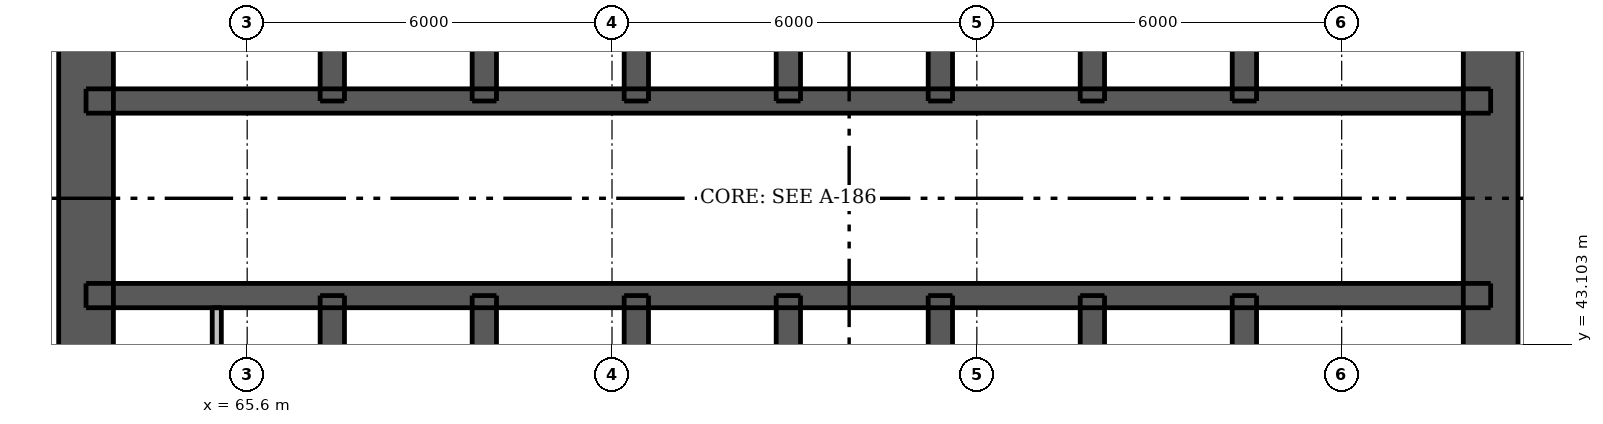
"""IFC4 building model, lengths in metres.
Left out: names, types, materials, properties, quantities, classifications, styles, units other than length and angle.
Written with IfcOpenShell. Run it as: python <this file> out.ifc"""

import sys

from ifc_helpers import new_model, si_unit, direction, frame, frame_2d, origin, place, context, subcontext, project, spatial, rectangle, extrude, element, fill, save


model = new_model("IFC4")
c1 = context("Model", 3, precision=1e-05, world=origin(), true_north=direction((0.0, 1.0)))
c2 = subcontext(c1, "Body", "Model", "MODEL_VIEW")
j1 = project(units=[si_unit("LENGTHUNIT", "METRE"), si_unit("PLANEANGLEUNIT", "RADIAN")], contexts=[c1])
p1 = place(None, origin())
s1 = spatial("IfcSite", under=j1, at=p1, CompositionType="ELEMENT")
p2 = place(p1, origin())
s2 = spatial("IfcBuilding", under=s1, at=p2, CompositionType="ELEMENT")
p3 = place(p2, frame((0.0, 0.0, 33.4)))
s3 = spatial("IfcBuildingStorey", under=s2, at=p3, CompositionType="ELEMENT", Elevation=33.4)
p4 = place(p3, frame((62.95, 33.5, 0.0), z_axis=(0.0, 0.0, 1.0), x_axis=(0.0, 1.0, 0.0)))
e1 = element("IfcWall", 1, at=p4, inside=s3, PredefinedType="SHEAR", context=c2, shape_type="SweptSolid", body=[
    extrude(rectangle(XDim=24.0, YDim=0.9, at=frame_2d((12.0, 0.0))), origin(), (0.0, 0.0, 1.0), 3.05),
])
p5 = place(p4, frame((11.2, 0.0, 0.0)))
e2 = element("IfcOpeningElement", 2, at=p5, cuts=e1, PredefinedType="OPENING", context=c2, shape_type="SweptSolid", body=[
    extrude(rectangle(XDim=1.6, YDim=2.1, at=frame_2d((0.8, 1.05))), frame((0.0, 0.46, 0.0), z_axis=(0.0, -1.0, 0.0), x_axis=(1.0, 0.0, 0.0)), (0.0, 0.0, 1.0), 0.92),
])
p6 = place(p3, frame((86.05, 33.5, 0.0), z_axis=(0.0, 0.0, 1.0), x_axis=(0.0, 1.0, 0.0)))
e3 = element("IfcWall", 3, at=p6, inside=s3, PredefinedType="SHEAR", context=c2, shape_type="SweptSolid", body=[
    extrude(rectangle(XDim=24.0, YDim=0.9, at=frame_2d((12.0, 0.0))), origin(), (0.0, 0.0, 1.0), 3.05),
])
p7 = place(p6, frame((11.2, 0.0, 0.0)))
e4 = element("IfcOpeningElement", 4, at=p7, cuts=e3, PredefinedType="OPENING", context=c2, shape_type="SweptSolid", body=[
    extrude(rectangle(XDim=1.6, YDim=2.1, at=frame_2d((0.8, 1.05))), frame((0.0, 0.46, 0.0), z_axis=(0.0, -1.0, 0.0), x_axis=(1.0, 0.0, 0.0)), (0.0, 0.0, 1.0), 0.92),
])
p8 = place(p3, frame((62.95, 43.9, 0.0), z_axis=(0.0, 0.0, 1.0), x_axis=(1.0, 0.0, 0.0)))
e5 = element("IfcWall", 5, at=p8, inside=s3, PredefinedType="SHEAR", context=c2, shape_type="SweptSolid", body=[
    extrude(rectangle(XDim=23.1, YDim=0.4, at=frame_2d((11.55, 0.0))), origin(), (0.0, 0.0, 1.0), 3.05),
])
p9 = place(p8, frame((0.85, 0.0, 0.0)))
e6 = element("IfcOpeningElement", 6, at=p9, cuts=e5, PredefinedType="OPENING", context=c2, shape_type="SweptSolid", body=[
    extrude(rectangle(XDim=0.9, YDim=2.1, at=frame_2d((0.45, 1.05))), frame((0.0, 0.21, 0.0), z_axis=(0.0, -1.0, 0.0), x_axis=(1.0, 0.0, 0.0)), (0.0, 0.0, 1.0), 0.42),
])
p10 = place(p8, frame((2.55, 0.0, 0.0)))
e7 = element("IfcOpeningElement", 7, at=p10, cuts=e5, PredefinedType="OPENING", context=c2, shape_type="SweptSolid", body=[
    extrude(rectangle(XDim=0.9, YDim=2.1, at=frame_2d((0.45, 1.05))), frame((0.0, 0.21, 0.0), z_axis=(0.0, -1.0, 0.0), x_axis=(1.0, 0.0, 0.0)), (0.0, 0.0, 1.0), 0.42),
])
p11 = place(p8, frame((20.5, 0.0, 0.0)))
e8 = element("IfcOpeningElement", 8, at=p11, cuts=e5, PredefinedType="OPENING", context=c2, shape_type="SweptSolid", body=[
    extrude(rectangle(XDim=0.9, YDim=2.1, at=frame_2d((0.45, 1.05))), frame((0.0, 0.21, 0.0), z_axis=(0.0, -1.0, 0.0), x_axis=(1.0, 0.0, 0.0)), (0.0, 0.0, 1.0), 0.42),
])
p12 = place(p8, frame((4.75, 0.0, 0.0)))
e9 = element("IfcOpeningElement", 9, at=p12, cuts=e5, PredefinedType="OPENING", context=c2, shape_type="SweptSolid", body=[
    extrude(rectangle(XDim=1.1, YDim=2.1, at=frame_2d((0.55, 1.05))), frame((0.0, 0.21, 0.0), z_axis=(0.0, -1.0, 0.0), x_axis=(1.0, 0.0, 0.0)), (0.0, 0.0, 1.0), 0.42),
])
p13 = place(p8, frame((7.25, 0.0, 0.0)))
e10 = element("IfcOpeningElement", 10, at=p13, cuts=e5, PredefinedType="OPENING", context=c2, shape_type="SweptSolid", body=[
    extrude(rectangle(XDim=1.1, YDim=2.1, at=frame_2d((0.55, 1.05))), frame((0.0, 0.21, 0.0), z_axis=(0.0, -1.0, 0.0), x_axis=(1.0, 0.0, 0.0)), (0.0, 0.0, 1.0), 0.42),
])
p14 = place(p8, frame((9.75, 0.0, 0.0)))
e11 = element("IfcOpeningElement", 11, at=p14, cuts=e5, PredefinedType="OPENING", context=c2, shape_type="SweptSolid", body=[
    extrude(rectangle(XDim=1.1, YDim=2.1, at=frame_2d((0.55, 1.05))), frame((0.0, 0.21, 0.0), z_axis=(0.0, -1.0, 0.0), x_axis=(1.0, 0.0, 0.0)), (0.0, 0.0, 1.0), 0.42),
])
p15 = place(p8, frame((12.25, 0.0, 0.0)))
e12 = element("IfcOpeningElement", 12, at=p15, cuts=e5, PredefinedType="OPENING", context=c2, shape_type="SweptSolid", body=[
    extrude(rectangle(XDim=1.1, YDim=2.1, at=frame_2d((0.55, 1.05))), frame((0.0, 0.21, 0.0), z_axis=(0.0, -1.0, 0.0), x_axis=(1.0, 0.0, 0.0)), (0.0, 0.0, 1.0), 0.42),
])
p16 = place(p8, frame((14.75, 0.0, 0.0)))
e13 = element("IfcOpeningElement", 13, at=p16, cuts=e5, PredefinedType="OPENING", context=c2, shape_type="SweptSolid", body=[
    extrude(rectangle(XDim=1.1, YDim=2.1, at=frame_2d((0.55, 1.05))), frame((0.0, 0.21, 0.0), z_axis=(0.0, -1.0, 0.0), x_axis=(1.0, 0.0, 0.0)), (0.0, 0.0, 1.0), 0.42),
])
p17 = place(p8, frame((17.25, 0.0, 0.0)))
e14 = element("IfcOpeningElement", 14, at=p17, cuts=e5, PredefinedType="OPENING", context=c2, shape_type="SweptSolid", body=[
    extrude(rectangle(XDim=1.1, YDim=2.1, at=frame_2d((0.55, 1.05))), frame((0.0, 0.21, 0.0), z_axis=(0.0, -1.0, 0.0), x_axis=(1.0, 0.0, 0.0)), (0.0, 0.0, 1.0), 0.42),
])
p18 = place(p3, frame((62.95, 47.1, 0.0), z_axis=(0.0, 0.0, 1.0), x_axis=(1.0, 0.0, 0.0)))
e15 = element("IfcWall", 15, at=p18, inside=s3, PredefinedType="SHEAR", context=c2, shape_type="SweptSolid", body=[
    extrude(rectangle(XDim=23.1, YDim=0.4, at=frame_2d((11.55, 0.0))), origin(), (0.0, 0.0, 1.0), 3.05),
])
p19 = place(p18, frame((1.7, 0.0, 0.0)))
e16 = element("IfcOpeningElement", 16, at=p19, cuts=e15, PredefinedType="OPENING", context=c2, shape_type="SweptSolid", body=[
    extrude(rectangle(XDim=0.9, YDim=2.1, at=frame_2d((0.45, 1.05))), frame((0.0, 0.21, 0.0), z_axis=(0.0, -1.0, 0.0), x_axis=(1.0, 0.0, 0.0)), (0.0, 0.0, 1.0), 0.42),
])
p20 = place(p18, frame((20.5, 0.0, 0.0)))
e17 = element("IfcOpeningElement", 17, at=p20, cuts=e15, PredefinedType="OPENING", context=c2, shape_type="SweptSolid", body=[
    extrude(rectangle(XDim=0.9, YDim=2.1, at=frame_2d((0.45, 1.05))), frame((0.0, 0.21, 0.0), z_axis=(0.0, -1.0, 0.0), x_axis=(1.0, 0.0, 0.0)), (0.0, 0.0, 1.0), 0.42),
])
p21 = place(p3, frame((67.0, 33.95, 0.0), z_axis=(0.0, 0.0, 1.0), x_axis=(0.0, 1.0, 0.0)))
e18 = element("IfcWall", 18, at=p21, inside=s3, PredefinedType="SHEAR", context=c2, shape_type="SweptSolid", body=[
    extrude(rectangle(XDim=9.95, YDim=0.4, at=frame_2d((4.975, 0.0))), origin(), (0.0, 0.0, 1.0), 3.05),
])
p22 = place(p21, frame((0.65, 0.0, 0.0)))
e19 = element("IfcOpeningElement", 19, at=p22, cuts=e18, PredefinedType="OPENING", context=c2, shape_type="SweptSolid", body=[
    extrude(rectangle(XDim=1.1, YDim=2.1, at=frame_2d((0.55, 1.05))), frame((0.0, 0.21, 0.0), z_axis=(0.0, -1.0, 0.0), x_axis=(1.0, 0.0, 0.0)), (0.0, 0.0, 1.0), 0.42),
])
for number, where, z_axis, x_axis in (
    (20, (67.0, 47.1, 0.0), (0.0, 0.0, 1.0), (0.0, 1.0, 0.0)),
    (21, (82.0, 33.95, 0.0), (0.0, 0.0, 1.0), (0.0, 1.0, 0.0)),
    (22, (82.0, 47.1, 0.0), (0.0, 0.0, 1.0), (0.0, 1.0, 0.0)),
):
    element("IfcWall", number, at=place(p3, frame(where, z_axis=z_axis, x_axis=x_axis)), inside=s3, PredefinedType="SHEAR", context=c2, shape_type="SweptSolid", body=[
        extrude(rectangle(XDim=9.95, YDim=0.4, at=frame_2d((4.975, 0.0))), origin(), (0.0, 0.0, 1.0), 3.05),
    ])
for number, where, z_axis, x_axis in (
    (23, (69.5, 41.0, 0.0), (0.0, 0.0, 1.0), (0.0, 1.0, 0.0)),
    (24, (69.5, 47.1, 0.0), (0.0, 0.0, 1.0), (0.0, 1.0, 0.0)),
    (25, (72.0, 41.0, 0.0), (0.0, 0.0, 1.0), (0.0, 1.0, 0.0)),
    (26, (72.0, 47.1, 0.0), (0.0, 0.0, 1.0), (0.0, 1.0, 0.0)),
    (27, (74.5, 41.0, 0.0), (0.0, 0.0, 1.0), (0.0, 1.0, 0.0)),
    (28, (74.5, 47.1, 0.0), (0.0, 0.0, 1.0), (0.0, 1.0, 0.0)),
    (29, (77.0, 41.0, 0.0), (0.0, 0.0, 1.0), (0.0, 1.0, 0.0)),
    (30, (77.0, 47.1, 0.0), (0.0, 0.0, 1.0), (0.0, 1.0, 0.0)),
    (31, (79.5, 41.0, 0.0), (0.0, 0.0, 1.0), (0.0, 1.0, 0.0)),
    (32, (79.5, 47.1, 0.0), (0.0, 0.0, 1.0), (0.0, 1.0, 0.0)),
):
    element("IfcWall", number, at=place(p3, frame(where, z_axis=z_axis, x_axis=x_axis)), inside=s3, PredefinedType="SHEAR", context=c2, shape_type="SweptSolid", body=[
        extrude(rectangle(XDim=2.9, YDim=0.4, at=frame_2d((1.45, 0.0))), origin(), (0.0, 0.0, 1.0), 3.05),
    ])
p23 = place(p3, frame((65.1, 41.2, 0.0), z_axis=(0.0, 0.0, 1.0), x_axis=(0.0, 1.0, 0.0)))
e33 = element("IfcWall", 33, at=p23, inside=s3, PredefinedType="PLUMBINGWALL", context=c2, shape_type="SweptSolid", body=[
    extrude(rectangle(XDim=2.5, YDim=0.15, at=frame_2d((1.25, 0.0))), origin(), (0.0, 0.0, 1.0), 3.05),
])
p24 = place(p5, origin())
e34 = element("IfcDoor", 34, at=p24, inside=s3, OperationType="DOUBLE_DOOR_SINGLE_SWING", PredefinedType="DOOR", context=c2, shape_type="SweptSolid", body=[
    extrude(rectangle(XDim=1.6, YDim=2.1, at=frame_2d((0.8, 1.05))), frame((0.0, -0.388, 0.0), z_axis=(0.0, -1.0, 0.0), x_axis=(1.0, 0.0, 0.0)), (0.0, 0.0, 1.0), 0.05),
])
fill(e2, e34)
p25 = place(p7, origin())
e35 = element("IfcDoor", 35, at=p25, inside=s3, OperationType="DOUBLE_DOOR_SINGLE_SWING", PredefinedType="DOOR", context=c2, shape_type="SweptSolid", body=[
    extrude(rectangle(XDim=1.6, YDim=2.1, at=frame_2d((0.8, 1.05))), frame((0.0, 0.438, 0.0), z_axis=(0.0, -1.0, 0.0), x_axis=(1.0, 0.0, 0.0)), (0.0, 0.0, 1.0), 0.05),
])
fill(e4, e35)
p26 = place(p9, origin())
e36 = element("IfcDoor", 36, at=p26, inside=s3, OperationType="SINGLE_SWING_LEFT", PredefinedType="DOOR", context=c2, shape_type="SweptSolid", body=[
    extrude(rectangle(XDim=0.9, YDim=2.1, at=frame_2d((0.45, 1.05))), frame((0.0, -0.138, 0.0), z_axis=(0.0, -1.0, 0.0), x_axis=(1.0, 0.0, 0.0)), (0.0, 0.0, 1.0), 0.05),
])
fill(e6, e36)
p27 = place(p10, origin())
e37 = element("IfcDoor", 37, at=p27, inside=s3, OperationType="SINGLE_SWING_RIGHT", PredefinedType="DOOR", context=c2, shape_type="SweptSolid", body=[
    extrude(rectangle(XDim=0.9, YDim=2.1, at=frame_2d((0.45, 1.05))), frame((0.0, -0.138, 0.0), z_axis=(0.0, -1.0, 0.0), x_axis=(1.0, 0.0, 0.0)), (0.0, 0.0, 1.0), 0.05),
])
fill(e7, e37)
p28 = place(p11, origin())
e38 = element("IfcDoor", 38, at=p28, inside=s3, OperationType="SINGLE_SWING_LEFT", PredefinedType="DOOR", context=c2, shape_type="SweptSolid", body=[
    extrude(rectangle(XDim=0.9, YDim=2.1, at=frame_2d((0.45, 1.05))), frame((0.0, -0.138, 0.0), z_axis=(0.0, -1.0, 0.0), x_axis=(1.0, 0.0, 0.0)), (0.0, 0.0, 1.0), 0.05),
])
fill(e8, e38)
p29 = place(p19, origin())
e39 = element("IfcDoor", 39, at=p29, inside=s3, OperationType="SINGLE_SWING_LEFT", PredefinedType="DOOR", context=c2, shape_type="SweptSolid", body=[
    extrude(rectangle(XDim=0.9, YDim=2.1, at=frame_2d((0.45, 1.05))), frame((0.0, 0.188, 0.0), z_axis=(0.0, -1.0, 0.0), x_axis=(1.0, 0.0, 0.0)), (0.0, 0.0, 1.0), 0.05),
])
fill(e16, e39)
p30 = place(p20, origin())
e40 = element("IfcDoor", 40, at=p30, inside=s3, OperationType="SINGLE_SWING_LEFT", PredefinedType="DOOR", context=c2, shape_type="SweptSolid", body=[
    extrude(rectangle(XDim=0.9, YDim=2.1, at=frame_2d((0.45, 1.05))), frame((0.0, 0.188, 0.0), z_axis=(0.0, -1.0, 0.0), x_axis=(1.0, 0.0, 0.0)), (0.0, 0.0, 1.0), 0.05),
])
fill(e17, e40)
p31 = place(p12, origin())
e41 = element("IfcDoor", 41, at=p31, inside=s3, OperationType="DOUBLE_DOOR_SLIDING", PredefinedType="DOOR", context=c2, shape_type="SweptSolid", body=[
    extrude(rectangle(XDim=1.1, YDim=2.1, at=frame_2d((0.55, 1.05))), frame((0.0, 0.025, 0.0), z_axis=(0.0, -1.0, 0.0), x_axis=(1.0, 0.0, 0.0)), (0.0, 0.0, 1.0), 0.05),
])
fill(e9, e41)
p32 = place(p13, origin())
e42 = element("IfcDoor", 42, at=p32, inside=s3, OperationType="DOUBLE_DOOR_SLIDING", PredefinedType="DOOR", context=c2, shape_type="SweptSolid", body=[
    extrude(rectangle(XDim=1.1, YDim=2.1, at=frame_2d((0.55, 1.05))), frame((0.0, 0.025, 0.0), z_axis=(0.0, -1.0, 0.0), x_axis=(1.0, 0.0, 0.0)), (0.0, 0.0, 1.0), 0.05),
])
fill(e10, e42)
p33 = place(p14, origin())
e43 = element("IfcDoor", 43, at=p33, inside=s3, OperationType="DOUBLE_DOOR_SLIDING", PredefinedType="DOOR", context=c2, shape_type="SweptSolid", body=[
    extrude(rectangle(XDim=1.1, YDim=2.1, at=frame_2d((0.55, 1.05))), frame((0.0, 0.025, 0.0), z_axis=(0.0, -1.0, 0.0), x_axis=(1.0, 0.0, 0.0)), (0.0, 0.0, 1.0), 0.05),
])
fill(e11, e43)
p34 = place(p15, origin())
e44 = element("IfcDoor", 44, at=p34, inside=s3, OperationType="DOUBLE_DOOR_SLIDING", PredefinedType="DOOR", context=c2, shape_type="SweptSolid", body=[
    extrude(rectangle(XDim=1.1, YDim=2.1, at=frame_2d((0.55, 1.05))), frame((0.0, 0.025, 0.0), z_axis=(0.0, -1.0, 0.0), x_axis=(1.0, 0.0, 0.0)), (0.0, 0.0, 1.0), 0.05),
])
fill(e12, e44)
p35 = place(p16, origin())
e45 = element("IfcDoor", 45, at=p35, inside=s3, OperationType="DOUBLE_DOOR_SLIDING", PredefinedType="DOOR", context=c2, shape_type="SweptSolid", body=[
    extrude(rectangle(XDim=1.1, YDim=2.1, at=frame_2d((0.55, 1.05))), frame((0.0, 0.025, 0.0), z_axis=(0.0, -1.0, 0.0), x_axis=(1.0, 0.0, 0.0)), (0.0, 0.0, 1.0), 0.05),
])
fill(e13, e45)
p36 = place(p17, origin())
e46 = element("IfcDoor", 46, at=p36, inside=s3, OperationType="DOUBLE_DOOR_SLIDING", PredefinedType="DOOR", context=c2, shape_type="SweptSolid", body=[
    extrude(rectangle(XDim=1.1, YDim=2.1, at=frame_2d((0.55, 1.05))), frame((0.0, 0.025, 0.0), z_axis=(0.0, -1.0, 0.0), x_axis=(1.0, 0.0, 0.0)), (0.0, 0.0, 1.0), 0.05),
])
fill(e14, e46)
save(model, sys.argv[1])
